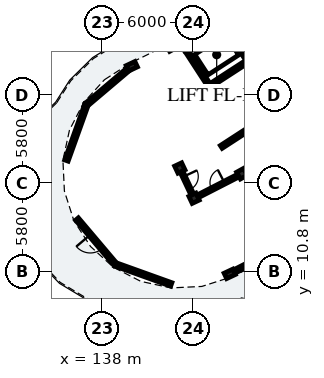
"""IFC4 building model, lengths in metres.
Left out: names, types, materials, properties, quantities, classifications, styles, units other than length and angle.
Written with IfcOpenShell. Run it as: python <this file> out.ifc"""

import sys

from ifc_helpers import new_model, si_unit, direction, frame, frame_2d, origin, origin_2d, place, context, subcontext, project, spatial, rectangle, extrude, element, fill, save


model = new_model("IFC4")
c1 = context("Model", 3, precision=1e-05, world=origin(), true_north=direction((0.0, 1.0)))
c2 = subcontext(c1, "Body", "Model", "MODEL_VIEW")
j1 = project(units=[si_unit("LENGTHUNIT", "METRE"), si_unit("PLANEANGLEUNIT", "RADIAN")], contexts=[c1])
p1 = place(None, origin())
s1 = spatial("IfcSite", under=j1, at=p1, CompositionType="ELEMENT")
p2 = place(p1, origin())
s2 = spatial("IfcBuilding", under=s1, at=p2, CompositionType="ELEMENT")
p3 = place(p2, frame((0.0, 0.0, 29.0)))
s3 = spatial("IfcBuildingStorey", under=s2, at=p3, CompositionType="ELEMENT", Elevation=29.0)
p4 = place(p3, frame((150.015, 21.757, 0.0), z_axis=(0.0, 0.0, 1.0), x_axis=(-0.544629435258, 0.838676802022, 0.0)))
e1 = element("IfcWall", 1, at=p4, inside=s3, PredefinedType="SHEAR", context=c2, shape_type="SweptSolid", body=[
    extrude(rectangle(XDim=6.6, YDim=0.25, at=frame_2d((3.3, 0.0))), origin(), (0.0, 0.0, 1.0), 3.11),
])
p5 = place(p4, frame((0.22, 0.0, 0.0)))
e2 = element("IfcOpeningElement", 2, at=p5, cuts=e1, PredefinedType="OPENING", context=c2, shape_type="SweptSolid", body=[
    extrude(rectangle(XDim=1.05, YDim=2.15, at=frame_2d((0.525, 1.075))), frame((0.0, 0.135, 0.0), z_axis=(0.0, -1.0, 0.0), x_axis=(1.0, 0.0, 0.0)), (0.0, 0.0, 1.0), 0.27),
])
p6 = place(p3, frame((147.708, 24.713, 0.0), z_axis=(0.0, 0.0, 1.0), x_axis=(-0.838672833615, -0.544635546173, 0.0)))
e3 = element("IfcWall", 3, at=p6, inside=s3, PredefinedType="SHEAR", context=c2, shape_type="SweptSolid", body=[
    extrude(rectangle(XDim=3.26, YDim=0.23, at=frame_2d((1.63, 0.0))), origin(), (0.0, 0.0, 1.0), 3.11),
])
p7 = place(p6, frame((0.9, 0.0, 0.0)))
e4 = element("IfcOpeningElement", 4, at=p7, cuts=e3, PredefinedType="OPENING", context=c2, shape_type="SweptSolid", body=[
    extrude(rectangle(XDim=1.1, YDim=2.15, at=frame_2d((0.55, 1.075))), frame((0.0, 0.125, 0.0), z_axis=(0.0, -1.0, 0.0), x_axis=(1.0, 0.0, 0.0)), (0.0, 0.0, 1.0), 0.25),
])
for number, where, z_axis, x_axis in (
    (5, (147.55, 24.747, 0.0), (0.0, 0.0, 1.0), (-0.545, 0.839, 0.0)),
    (6, (145.008, 23.096, 0.0), (0.0, 0.0, 1.0), (-0.545, 0.839, 0.0)),
):
    element("IfcWall", number, at=place(p3, frame(where, z_axis=z_axis, x_axis=x_axis)), inside=s3, PredefinedType="SHEAR", context=c2, shape_type="SweptSolid", body=[
        extrude(rectangle(XDim=2.7, YDim=0.23, at=frame_2d((1.35, 0.0))), origin(), (0.0, 0.0, 1.0), 3.11),
    ])
p8 = place(p3, frame((139.961, 24.297, 0.0), z_axis=(0.0, 0.0, 1.0), x_axis=(0.426568739901, -0.904455145454, 0.0)))
e7 = element("IfcColumn", 7, at=p8, inside=s3, PredefinedType="PILASTER", context=c2, shape_type="SweptSolid", body=[
    extrude(rectangle(XDim=0.39, YDim=0.63, at=origin_2d()), origin(), (0.0, 0.0, 1.0), 3.125),
])
for number, where, z_axis, x_axis in (
    (8, (143.118, 17.604, 0.0), (0.0, 0.0, 1.0), (0.427, -0.904, 0.0)),
    (9, (144.056, 15.614, 0.0), (0.0, 0.0, 1.0), (0.427, -0.904, 0.0)),
):
    element("IfcColumn", number, at=place(p3, frame(where, z_axis=z_axis, x_axis=x_axis)), inside=s3, PredefinedType="COLUMN", context=c2, shape_type="SweptSolid", body=[
        extrude(rectangle(XDim=0.51, YDim=0.51, at=origin_2d()), origin(), (0.0, 0.0, 1.0), 3.125),
    ])
p9 = place(p3, frame((146.402, 10.64, 0.0), z_axis=(0.0, 0.0, 1.0), x_axis=(0.426568739901, -0.904455145454, 0.0)))
e10 = element("IfcColumn", 10, at=p9, inside=s3, PredefinedType="PILASTER", context=c2, shape_type="SweptSolid", body=[
    extrude(rectangle(XDim=0.39, YDim=0.63, at=origin_2d()), origin(), (0.0, 0.0, 1.0), 3.125),
])
p10 = place(p3, frame((147.204, 17.227, 0.0), z_axis=(0.0, 0.0, 1.0), x_axis=(0.484809620246, -0.874619707139, 0.0)))
e11 = element("IfcColumn", 11, at=p10, inside=s3, PredefinedType="COLUMN", context=c2, shape_type="SweptSolid", body=[
    extrude(rectangle(XDim=0.51, YDim=0.51, at=origin_2d()), origin(), (0.0, 0.0, 1.0), 3.125),
])
p11 = place(p3, frame((146.549, 10.715, 0.0), z_axis=(0.0, 0.0, 1.0), x_axis=(0.890012358945, 0.455936400088, 0.0)))
e12 = element("IfcWall", 12, at=p11, inside=s3, PredefinedType="SOLIDWALL", context=c2, shape_type="SweptSolid", body=[
    extrude(rectangle(XDim=3.507, YDim=0.24, at=frame_2d((1.753, 0.0))), origin(), (0.0, 0.0, 1.0), 2.355),
])
p12 = place(p11, frame((0.933, 0.0, 0.55)))
e13 = element("IfcOpeningElement", 13, at=p12, cuts=e12, PredefinedType="OPENING", context=c2, shape_type="SweptSolid", body=[
    extrude(rectangle(XDim=1.64, YDim=1.56, at=frame_2d((0.82, 0.78))), frame((0.0, 0.13, 0.0), z_axis=(0.0, -1.0, 0.0), x_axis=(1.0, 0.0, 0.0)), (0.0, 0.0, 1.0), 0.26),
])
p13 = place(p3, frame((142.556, 9.944, 0.0), z_axis=(0.0, 0.0, 1.0), x_axis=(-0.941180917007, 0.337903065186, 0.0)))
e14 = element("IfcWall", 14, at=p13, inside=s3, PredefinedType="SOLIDWALL", context=c2, shape_type="SweptSolid", body=[
    extrude(rectangle(XDim=3.908, YDim=0.24, at=frame_2d((1.954, 0.0))), origin(), (0.0, 0.0, 1.0), 2.355),
])
p14 = place(p13, frame((0.979, 0.0, 0.4)))
e15 = element("IfcOpeningElement", 15, at=p14, cuts=e14, PredefinedType="OPENING", context=c2, shape_type="SweptSolid", body=[
    extrude(rectangle(XDim=1.95, YDim=1.78, at=frame_2d((0.975, 0.89))), frame((0.0, 0.13, 0.0), z_axis=(0.0, -1.0, 0.0), x_axis=(1.0, 0.0, 0.0)), (0.0, 0.0, 1.0), 0.26),
])
p15 = place(p3, frame((138.878, 11.265, 0.0), z_axis=(0.0, 0.0, 1.0), x_axis=(-0.646113044688, 0.763241726771, 0.0)))
e16 = element("IfcWall", 16, at=p15, inside=s3, PredefinedType="SOLIDWALL", context=c2, shape_type="SweptSolid", body=[
    extrude(rectangle(XDim=3.908, YDim=0.24, at=frame_2d((1.954, 0.0))), origin(), (0.0, 0.0, 1.0), 2.355),
])
p16 = place(p15, frame((1.354, 0.0, 0.0)))
e17 = element("IfcOpeningElement", 17, at=p16, cuts=e16, PredefinedType="OPENING", context=c2, shape_type="SweptSolid", body=[
    extrude(rectangle(XDim=1.2, YDim=2.15, at=frame_2d((0.6, 1.075))), frame((0.0, 0.13, 0.0), z_axis=(0.0, -1.0, 0.0), x_axis=(1.0, 0.0, 0.0)), (0.0, 0.0, 1.0), 0.26),
])
p17 = place(p3, frame((135.657, 18.094, 0.0), z_axis=(0.0, 0.0, 1.0), x_axis=(0.337903065186, 0.941180917007, 0.0)))
e18 = element("IfcWall", 18, at=p17, inside=s3, PredefinedType="SOLIDWALL", context=c2, shape_type="SweptSolid", body=[
    extrude(rectangle(XDim=3.908, YDim=0.24, at=frame_2d((1.954, 0.0))), origin(), (0.0, 0.0, 1.0), 2.355),
])
p18 = place(p17, frame((0.979, 0.0, 0.4)))
e19 = element("IfcOpeningElement", 19, at=p18, cuts=e18, PredefinedType="OPENING", context=c2, shape_type="SweptSolid", body=[
    extrude(rectangle(XDim=1.95, YDim=1.78, at=frame_2d((0.975, 0.89))), frame((0.0, 0.13, 0.0), z_axis=(0.0, -1.0, 0.0), x_axis=(1.0, 0.0, 0.0)), (0.0, 0.0, 1.0), 0.26),
])
p19 = place(p3, frame((136.978, 21.772, 0.0), z_axis=(0.0, 0.0, 1.0), x_axis=(0.763241726771, 0.646113044688, 0.0)))
e20 = element("IfcWall", 20, at=p19, inside=s3, PredefinedType="SOLIDWALL", context=c2, shape_type="SweptSolid", body=[
    extrude(rectangle(XDim=3.908, YDim=0.24, at=frame_2d((1.954, 0.0))), origin(), (0.0, 0.0, 1.0), 2.355),
])
p20 = place(p3, frame((149.955, 21.658, 0.0), z_axis=(0.0, 0.0, 1.0), x_axis=(-0.838681446513, -0.544622283124, 0.0)))
e21 = element("IfcWall", 21, at=p20, inside=s3, PredefinedType="PARTITIONING", context=c2, shape_type="SweptSolid", body=[
    extrude(rectangle(XDim=4.9, YDim=0.22, at=frame_2d((2.45, 0.0))), origin(), (0.0, 0.0, 1.0), 2.34),
])
p21 = place(p20, frame((1.95, 0.0, 0.0)))
e22 = element("IfcOpeningElement", 22, at=p21, cuts=e21, PredefinedType="OPENING", context=c2, shape_type="SweptSolid", body=[
    extrude(rectangle(XDim=1.0, YDim=2.15, at=frame_2d((0.5, 1.075))), frame((0.0, 0.12, 0.0), z_axis=(0.0, -1.0, 0.0), x_axis=(1.0, 0.0, 0.0)), (0.0, 0.0, 1.0), 0.24),
])
p22 = place(p3, frame((144.367, 15.774, 0.0), z_axis=(0.0, 0.0, 1.0), x_axis=(0.890030590607, 0.45590080915, 0.0)))
e23 = element("IfcWall", 23, at=p22, inside=s3, PredefinedType="PARTITIONING", context=c2, shape_type="SweptSolid", body=[
    extrude(rectangle(XDim=2.837, YDim=0.195, at=frame_2d((1.418, 0.0))), origin(), (0.0, 0.0, 1.0), 2.37),
])
p23 = place(p22, frame((0.944, 0.0, 0.0)))
e24 = element("IfcOpeningElement", 24, at=p23, cuts=e23, PredefinedType="OPENING", context=c2, shape_type="SweptSolid", body=[
    extrude(rectangle(XDim=0.95, YDim=2.13, at=frame_2d((0.475, 1.065))), frame((0.0, 0.107, 0.0), z_axis=(0.0, -1.0, 0.0), x_axis=(1.0, 0.0, 0.0)), (0.0, 0.0, 1.0), 0.215),
])
p24 = place(p3, frame((143.139, 17.559, 0.0), z_axis=(0.0, 0.0, 1.0), x_axis=(0.426541520305, -0.904467982549, 0.0)))
e25 = element("IfcWall", 25, at=p24, inside=s3, PredefinedType="PARTITIONING", context=c2, shape_type="SweptSolid", body=[
    extrude(rectangle(XDim=2.1, YDim=0.195, at=frame_2d((1.05, 0.0))), origin(), (0.0, 0.0, 1.0), 2.37),
])
p25 = place(p24, frame((0.57, 0.0, 0.0)))
e26 = element("IfcOpeningElement", 26, at=p25, cuts=e25, PredefinedType="OPENING", context=c2, shape_type="SweptSolid", body=[
    extrude(rectangle(XDim=0.95, YDim=2.13, at=frame_2d((0.475, 1.065))), frame((0.0, 0.107, 0.0), z_axis=(0.0, -1.0, 0.0), x_axis=(1.0, 0.0, 0.0)), (0.0, 0.0, 1.0), 0.215),
])
p26 = place(p14, origin())
e27 = element("IfcWindow", 27, at=p26, inside=s3, PartitioningType="SINGLE_PANEL", PredefinedType="WINDOW", context=c2, shape_type="SweptSolid", body=[
    extrude(rectangle(XDim=1.95, YDim=1.78, at=frame_2d((0.975, 0.89))), frame((0.0, 0.03, 0.0), z_axis=(0.0, -1.0, 0.0), x_axis=(1.0, 0.0, 0.0)), (0.0, 0.0, 1.0), 0.06),
])
fill(e15, e27)
p27 = place(p16, origin())
e28 = element("IfcDoor", 28, at=p27, inside=s3, OperationType="SINGLE_SWING_RIGHT", PredefinedType="DOOR", context=c2, shape_type="SweptSolid", body=[
    extrude(rectangle(XDim=1.2, YDim=2.15, at=frame_2d((0.6, 1.075))), frame((0.0, 0.025, 0.0), z_axis=(0.0, -1.0, 0.0), x_axis=(1.0, 0.0, 0.0)), (0.0, 0.0, 1.0), 0.05),
])
fill(e17, e28)
p28 = place(p18, origin())
e29 = element("IfcWindow", 29, at=p28, inside=s3, PartitioningType="SINGLE_PANEL", PredefinedType="WINDOW", context=c2, shape_type="SweptSolid", body=[
    extrude(rectangle(XDim=1.95, YDim=1.78, at=frame_2d((0.975, 0.89))), frame((0.0, 0.03, 0.0), z_axis=(0.0, -1.0, 0.0), x_axis=(1.0, 0.0, 0.0)), (0.0, 0.0, 1.0), 0.06),
])
fill(e19, e29)
p29 = place(p7, origin())
e30 = element("IfcDoor", 30, at=p29, inside=s3, OperationType="DOUBLE_DOOR_SLIDING", PredefinedType="DOOR", context=c2, shape_type="SweptSolid", body=[
    extrude(rectangle(XDim=1.1, YDim=2.15, at=frame_2d((0.55, 1.075))), frame((0.0, 0.025, 0.0), z_axis=(0.0, -1.0, 0.0), x_axis=(1.0, 0.0, 0.0)), (0.0, 0.0, 1.0), 0.05),
])
fill(e4, e30)
p30 = place(p23, origin())
e31 = element("IfcDoor", 31, at=p30, inside=s3, OperationType="SINGLE_SWING_RIGHT", PredefinedType="DOOR", context=c2, shape_type="SweptSolid", body=[
    extrude(rectangle(XDim=0.95, YDim=2.13, at=frame_2d((0.475, 1.065))), frame((0.0, 0.025, 0.0), z_axis=(0.0, -1.0, 0.0), x_axis=(1.0, 0.0, 0.0)), (0.0, 0.0, 1.0), 0.05),
])
fill(e24, e31)
p31 = place(p25, origin())
e32 = element("IfcDoor", 32, at=p31, inside=s3, OperationType="SINGLE_SWING_LEFT", PredefinedType="DOOR", context=c2, shape_type="SweptSolid", body=[
    extrude(rectangle(XDim=0.95, YDim=2.13, at=frame_2d((0.475, 1.065))), frame((0.0, 0.025, 0.0), z_axis=(0.0, -1.0, 0.0), x_axis=(1.0, 0.0, 0.0)), (0.0, 0.0, 1.0), 0.05),
])
fill(e26, e32)
save(model, sys.argv[1])
